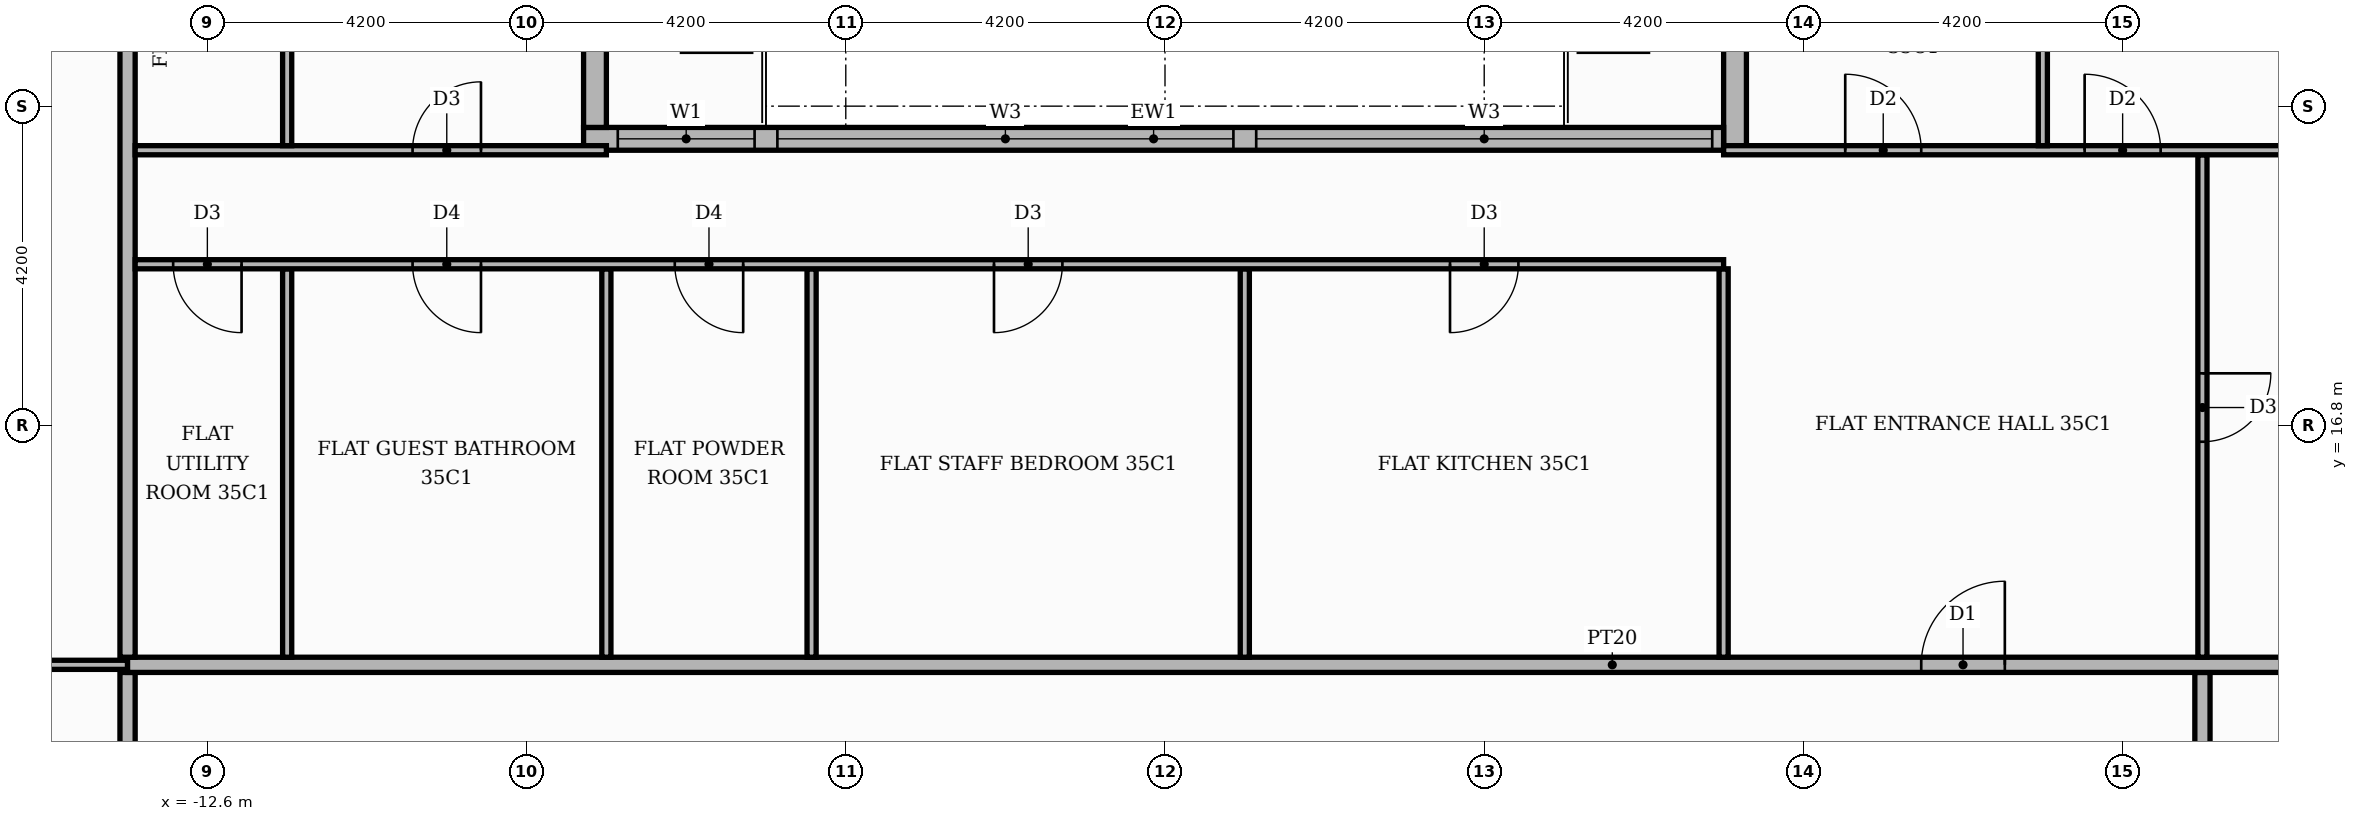
"""IFC4 building model, lengths in metres.
Left out: names, types, materials, properties, quantities, classifications, styles, units other than length and angle.
Written with IfcOpenShell. Run it as: python <this file> out.ifc"""

import sys

from ifc_helpers import new_model, si_unit, direction, frame, frame_2d, origin, place, context, subcontext, project, spatial, rectangle, extrude, element, fill, save


model = new_model("IFC4")
c1 = context("Model", 3, precision=1e-05, world=origin(), true_north=direction((0.0, 1.0)))
c2 = subcontext(c1, "Body", "Model", "MODEL_VIEW")
j1 = project(units=[si_unit("LENGTHUNIT", "METRE"), si_unit("PLANEANGLEUNIT", "RADIAN")], contexts=[c1])
p1 = place(None, origin())
s1 = spatial("IfcSite", under=j1, at=p1, CompositionType="ELEMENT")
p2 = place(p1, origin())
s2 = spatial("IfcBuilding", under=s1, at=p2, CompositionType="ELEMENT")
p3 = place(p2, frame((0.0, 0.0, 149.4)))
s3 = spatial("IfcBuildingStorey", under=s2, at=p3, CompositionType="ELEMENT", Elevation=149.4)
p4 = place(p3, frame((7.5, 25.42, 0.0), z_axis=(0.0, 0.0, 1.0), x_axis=(0.0, -1.0, 0.0)))
e1 = element("IfcWall", 1, at=p4, inside=s3, PredefinedType="STANDARD", context=c2, shape_type="SweptSolid", body=[
    extrude(rectangle(XDim=5.0, YDim=0.3, at=frame_2d((2.5, 0.0))), origin(), (0.0, 0.0, 1.0), 3.48),
])
p5 = place(p4, frame((1.42, 0.0, 0.0)))
e2 = element("IfcOpeningElement", 2, at=p5, cuts=e1, PredefinedType="OPENING", context=c2, shape_type="SweptSolid", body=[
    extrude(rectangle(XDim=1.8, YDim=2.4, at=frame_2d((0.9, 1.2))), frame((0.0, 0.16, 0.0), z_axis=(0.0, -1.0, 0.0), x_axis=(1.0, 0.0, 0.0)), (0.0, 0.0, 1.0), 0.32),
])
p6 = place(p3, frame((7.35, 20.57, 0.0), z_axis=(0.0, 0.0, 1.0), x_axis=(-1.0, 0.0, 0.0)))
e3 = element("IfcWall", 3, at=p6, inside=s3, PredefinedType="STANDARD", context=c2, shape_type="SweptSolid", body=[
    extrude(rectangle(XDim=15.0, YDim=0.3, at=frame_2d((7.5, 0.0))), origin(), (0.0, 0.0, 1.0), 3.48),
])
p7 = place(p6, frame((0.15, 0.0, 0.9)))
e4 = element("IfcOpeningElement", 4, at=p7, cuts=e3, PredefinedType="OPENING", context=c2, shape_type="SweptSolid", body=[
    extrude(rectangle(XDim=6.0, YDim=2.1, at=frame_2d((3.0, 1.05))), frame((0.0, 0.16, 0.0), z_axis=(0.0, -1.0, 0.0), x_axis=(1.0, 0.0, 0.0)), (0.0, 0.0, 1.0), 0.32),
])
p8 = place(p6, frame((6.45, 0.0, 0.9)))
e5 = element("IfcOpeningElement", 5, at=p8, cuts=e3, PredefinedType="OPENING", context=c2, shape_type="SweptSolid", body=[
    extrude(rectangle(XDim=6.0, YDim=2.1, at=frame_2d((3.0, 1.05))), frame((0.0, 0.16, 0.0), z_axis=(0.0, -1.0, 0.0), x_axis=(1.0, 0.0, 0.0)), (0.0, 0.0, 1.0), 0.32),
])
p9 = place(p6, frame((12.75, 0.0, 0.9)))
e6 = element("IfcOpeningElement", 6, at=p9, cuts=e3, PredefinedType="OPENING", context=c2, shape_type="SweptSolid", body=[
    extrude(rectangle(XDim=1.8, YDim=2.1, at=frame_2d((0.9, 1.05))), frame((0.0, 0.16, 0.0), z_axis=(0.0, -1.0, 0.0), x_axis=(1.0, 0.0, 0.0)), (0.0, 0.0, 1.0), 0.32),
])
p10 = place(p3, frame((-7.5, 20.72, 0.0), z_axis=(0.0, 0.0, 1.0), x_axis=(0.0, 1.0, 0.0)))
e7 = element("IfcWall", 7, at=p10, inside=s3, PredefinedType="STANDARD", context=c2, shape_type="SweptSolid", body=[
    extrude(rectangle(XDim=5.0, YDim=0.3, at=frame_2d((2.5, 0.0))), origin(), (0.0, 0.0, 1.0), 3.48),
])
p11 = place(p10, frame((1.48, 0.0, 0.0)))
e8 = element("IfcOpeningElement", 8, at=p11, cuts=e7, PredefinedType="OPENING", context=c2, shape_type="SweptSolid", body=[
    extrude(rectangle(XDim=1.8, YDim=2.4, at=frame_2d((0.9, 1.2))), frame((0.0, 0.16, 0.0), z_axis=(0.0, -1.0, 0.0), x_axis=(1.0, 0.0, 0.0)), (0.0, 0.0, 1.0), 0.32),
])
for number, where, z_axis, x_axis in (
    (9, (-13.65, 11.1, 0.0), (0.0, 0.0, 1.0), (0.0, 1.0, 0.0)),
    (10, (13.65, 11.1, 0.0), (0.0, 0.0, 1.0), (0.0, 1.0, 0.0)),
):
    element("IfcWall", number, at=place(p3, frame(where, z_axis=z_axis, x_axis=x_axis)), inside=s3, PredefinedType="PARTITIONING", context=c2, shape_type="SweptSolid", body=[
        extrude(rectangle(XDim=2.45, YDim=0.2, at=frame_2d((1.225, 0.0))), origin(), (0.0, 0.0, 1.0), 3.48),
    ])
p12 = place(p3, frame((-20.12, 13.65, 0.0), z_axis=(0.0, 0.0, 1.0), x_axis=(1.0, 0.0, 0.0)))
e11 = element("IfcWall", 11, at=p12, inside=s3, PredefinedType="PARTITIONING", context=c2, shape_type="SweptSolid", body=[
    extrude(rectangle(XDim=6.47, YDim=0.12, at=frame_2d((3.235, 0.0))), origin(), (0.0, 0.0, 1.0), 3.48),
])
p13 = place(p12, frame((2.785, 0.0, 0.0)))
e12 = element("IfcOpeningElement", 12, at=p13, cuts=e11, PredefinedType="OPENING", context=c2, shape_type="SweptSolid", body=[
    extrude(rectangle(XDim=0.9, YDim=2.1, at=frame_2d((0.45, 1.05))), frame((0.0, 0.07, 0.0), z_axis=(0.0, -1.0, 0.0), x_axis=(1.0, 0.0, 0.0)), (0.0, 0.0, 1.0), 0.14),
])
p14 = place(p3, frame((-13.65, 13.65, 0.0), z_axis=(0.0, 0.0, 1.0), x_axis=(1.0, 0.0, 0.0)))
e13 = element("IfcWall", 13, at=p14, inside=s3, PredefinedType="PARTITIONING", context=c2, shape_type="SweptSolid", body=[
    extrude(rectangle(XDim=39.07, YDim=0.2, at=frame_2d((19.535, 0.0))), origin(), (0.0, 0.0, 1.0), 3.48),
])
p15 = place(p14, frame((23.6, 0.0, 0.0)))
e14 = element("IfcOpeningElement", 14, at=p15, cuts=e13, PredefinedType="OPENING", context=c2, shape_type="SweptSolid", body=[
    extrude(rectangle(XDim=1.1, YDim=2.4, at=frame_2d((0.55, 1.2))), frame((0.0, 0.11, 0.0), z_axis=(0.0, -1.0, 0.0), x_axis=(1.0, 0.0, 0.0)), (0.0, 0.0, 1.0), 0.22),
])
p16 = place(p3, frame((-13.65, 13.75, 0.0), z_axis=(0.0, 0.0, 1.0), x_axis=(0.0, 1.0, 0.0)))
e15 = element("IfcWall", 15, at=p16, inside=s3, PredefinedType="PARTITIONING", context=c2, shape_type="SweptSolid", body=[
    extrude(rectangle(XDim=11.67, YDim=0.2, at=frame_2d((5.835, 0.0))), origin(), (0.0, 0.0, 1.0), 3.48),
])
for number, where, z_axis, x_axis in (
    (16, (-11.55, 13.75, 0.0), (0.0, 0.0, 1.0), (0.0, 1.0, 0.0)),
    (17, (-7.35, 13.75, 0.0), (0.0, 0.0, 1.0), (0.0, 1.0, 0.0)),
    (18, (-4.65, 13.75, 0.0), (0.0, 0.0, 1.0), (0.0, 1.0, 0.0)),
    (19, (1.05, 13.75, 0.0), (0.0, 0.0, 1.0), (0.0, 1.0, 0.0)),
    (20, (7.35, 13.75, 0.0), (0.0, 0.0, 1.0), (0.0, 1.0, 0.0)),
):
    element("IfcWall", number, at=place(p3, frame(where, z_axis=z_axis, x_axis=x_axis)), inside=s3, PredefinedType="PARTITIONING", context=c2, shape_type="SweptSolid", body=[
        extrude(rectangle(XDim=5.11, YDim=0.12, at=frame_2d((2.555, 0.0))), origin(), (0.0, 0.0, 1.0), 3.48),
    ])
p17 = place(p3, frame((13.65, 13.75, 0.0), z_axis=(0.0, 0.0, 1.0), x_axis=(0.0, 1.0, 0.0)))
e21 = element("IfcWall", 21, at=p17, inside=s3, PredefinedType="PARTITIONING", context=c2, shape_type="SweptSolid", body=[
    extrude(rectangle(XDim=6.61, YDim=0.12, at=frame_2d((3.305, 0.0))), origin(), (0.0, 0.0, 1.0), 3.48),
])
p18 = place(p17, frame((2.835, 0.0, 0.0)))
e22 = element("IfcOpeningElement", 22, at=p18, cuts=e21, PredefinedType="OPENING", context=c2, shape_type="SweptSolid", body=[
    extrude(rectangle(XDim=0.9, YDim=2.1, at=frame_2d((0.45, 1.05))), frame((0.0, 0.07, 0.0), z_axis=(0.0, -1.0, 0.0), x_axis=(1.0, 0.0, 0.0)), (0.0, 0.0, 1.0), 0.14),
])
p19 = place(p3, frame((-13.55, 18.92, 0.0), z_axis=(0.0, 0.0, 1.0), x_axis=(1.0, 0.0, 0.0)))
e23 = element("IfcWall", 23, at=p19, inside=s3, PredefinedType="PARTITIONING", context=c2, shape_type="SweptSolid", body=[
    extrude(rectangle(XDim=20.9, YDim=0.12, at=frame_2d((10.45, 0.0))), origin(), (0.0, 0.0, 1.0), 3.48),
])
p20 = place(p19, frame((17.3, 0.0, 0.0)))
e24 = element("IfcOpeningElement", 24, at=p20, cuts=e23, PredefinedType="OPENING", context=c2, shape_type="SweptSolid", body=[
    extrude(rectangle(XDim=0.9, YDim=2.1, at=frame_2d((0.45, 1.05))), frame((0.0, 0.07, 0.0), z_axis=(0.0, -1.0, 0.0), x_axis=(1.0, 0.0, 0.0)), (0.0, 0.0, 1.0), 0.14),
])
p21 = place(p19, frame((11.3, 0.0, 0.0)))
e25 = element("IfcOpeningElement", 25, at=p21, cuts=e23, PredefinedType="OPENING", context=c2, shape_type="SweptSolid", body=[
    extrude(rectangle(XDim=0.9, YDim=2.1, at=frame_2d((0.45, 1.05))), frame((0.0, 0.07, 0.0), z_axis=(0.0, -1.0, 0.0), x_axis=(1.0, 0.0, 0.0)), (0.0, 0.0, 1.0), 0.14),
])
p22 = place(p19, frame((7.1, 0.0, 0.0)))
e26 = element("IfcOpeningElement", 26, at=p22, cuts=e23, PredefinedType="OPENING", context=c2, shape_type="SweptSolid", body=[
    extrude(rectangle(XDim=0.9, YDim=2.1, at=frame_2d((0.45, 1.05))), frame((0.0, 0.07, 0.0), z_axis=(0.0, -1.0, 0.0), x_axis=(1.0, 0.0, 0.0)), (0.0, 0.0, 1.0), 0.14),
])
p23 = place(p19, frame((3.65, 0.0, 0.0)))
e27 = element("IfcOpeningElement", 27, at=p23, cuts=e23, PredefinedType="OPENING", context=c2, shape_type="SweptSolid", body=[
    extrude(rectangle(XDim=0.9, YDim=2.1, at=frame_2d((0.45, 1.05))), frame((0.0, 0.07, 0.0), z_axis=(0.0, -1.0, 0.0), x_axis=(1.0, 0.0, 0.0)), (0.0, 0.0, 1.0), 0.14),
])
p24 = place(p19, frame((0.5, 0.0, 0.0)))
e28 = element("IfcOpeningElement", 28, at=p24, cuts=e23, PredefinedType="OPENING", context=c2, shape_type="SweptSolid", body=[
    extrude(rectangle(XDim=0.9, YDim=2.1, at=frame_2d((0.45, 1.05))), frame((0.0, 0.07, 0.0), z_axis=(0.0, -1.0, 0.0), x_axis=(1.0, 0.0, 0.0)), (0.0, 0.0, 1.0), 0.14),
])
p25 = place(p3, frame((-13.55, 20.42, 0.0), z_axis=(0.0, 0.0, 1.0), x_axis=(1.0, 0.0, 0.0)))
e29 = element("IfcWall", 29, at=p25, inside=s3, PredefinedType="PARTITIONING", context=c2, shape_type="SweptSolid", body=[
    extrude(rectangle(XDim=6.2, YDim=0.12, at=frame_2d((3.1, 0.0))), origin(), (0.0, 0.0, 1.0), 3.48),
])
p26 = place(p25, frame((3.65, 0.0, 0.0)))
e30 = element("IfcOpeningElement", 30, at=p26, cuts=e29, PredefinedType="OPENING", context=c2, shape_type="SweptSolid", body=[
    extrude(rectangle(XDim=0.9, YDim=2.1, at=frame_2d((0.45, 1.05))), frame((0.0, 0.07, 0.0), z_axis=(0.0, -1.0, 0.0), x_axis=(1.0, 0.0, 0.0)), (0.0, 0.0, 1.0), 0.14),
])
p27 = place(p3, frame((7.35, 20.42, 0.0), z_axis=(0.0, 0.0, 1.0), x_axis=(1.0, 0.0, 0.0)))
e31 = element("IfcWall", 31, at=p27, inside=s3, PredefinedType="PARTITIONING", context=c2, shape_type="SweptSolid", body=[
    extrude(rectangle(XDim=18.07, YDim=0.12, at=frame_2d((9.035, 0.0))), origin(), (0.0, 0.0, 1.0), 3.48),
])
p28 = place(p27, frame((4.75, 0.0, 0.0)))
e32 = element("IfcOpeningElement", 32, at=p28, cuts=e31, PredefinedType="OPENING", context=c2, shape_type="SweptSolid", body=[
    extrude(rectangle(XDim=1.0, YDim=2.1, at=frame_2d((0.5, 1.05))), frame((0.0, 0.07, 0.0), z_axis=(0.0, -1.0, 0.0), x_axis=(1.0, 0.0, 0.0)), (0.0, 0.0, 1.0), 0.14),
])
p29 = place(p27, frame((1.6, 0.0, 0.0)))
e33 = element("IfcOpeningElement", 33, at=p29, cuts=e31, PredefinedType="OPENING", context=c2, shape_type="SweptSolid", body=[
    extrude(rectangle(XDim=1.0, YDim=2.1, at=frame_2d((0.5, 1.05))), frame((0.0, 0.07, 0.0), z_axis=(0.0, -1.0, 0.0), x_axis=(1.0, 0.0, 0.0)), (0.0, 0.0, 1.0), 0.14),
])
p30 = place(p3, frame((-11.55, 20.48, 0.0), z_axis=(0.0, 0.0, 1.0), x_axis=(0.0, 1.0, 0.0)))
e34 = element("IfcWall", 34, at=p30, inside=s3, PredefinedType="PARTITIONING", context=c2, shape_type="SweptSolid", body=[
    extrude(rectangle(XDim=4.94, YDim=0.12, at=frame_2d((2.47, 0.0))), origin(), (0.0, 0.0, 1.0), 3.48),
])
p31 = place(p30, frame((2.14, 0.0, 0.0)))
e35 = element("IfcOpeningElement", 35, at=p31, cuts=e34, PredefinedType="OPENING", context=c2, shape_type="SweptSolid", body=[
    extrude(rectangle(XDim=0.9, YDim=2.1, at=frame_2d((0.45, 1.05))), frame((0.0, 0.07, 0.0), z_axis=(0.0, -1.0, 0.0), x_axis=(1.0, 0.0, 0.0)), (0.0, 0.0, 1.0), 0.14),
])
p32 = place(p3, frame((11.55, 20.48, 0.0), z_axis=(0.0, 0.0, 1.0), x_axis=(0.0, 1.0, 0.0)))
e36 = element("IfcWall", 36, at=p32, inside=s3, PredefinedType="PARTITIONING", context=c2, shape_type="SweptSolid", body=[
    extrude(rectangle(XDim=4.94, YDim=0.12, at=frame_2d((2.47, 0.0))), origin(), (0.0, 0.0, 1.0), 3.48),
])
p33 = place(p7, origin())
e37 = element("IfcWindow", 37, at=p33, inside=s3, PartitioningType="SINGLE_PANEL", PredefinedType="WINDOW", context=c2, shape_type="SweptSolid", body=[
    extrude(rectangle(XDim=6.0, YDim=2.1, at=frame_2d((3.0, 1.05))), frame((0.0, 0.03, 0.0), z_axis=(0.0, -1.0, 0.0), x_axis=(1.0, 0.0, 0.0)), (0.0, 0.0, 1.0), 0.06),
])
fill(e4, e37)
p34 = place(p8, origin())
e38 = element("IfcWindow", 38, at=p34, inside=s3, PartitioningType="SINGLE_PANEL", PredefinedType="WINDOW", context=c2, shape_type="SweptSolid", body=[
    extrude(rectangle(XDim=6.0, YDim=2.1, at=frame_2d((3.0, 1.05))), frame((0.0, 0.03, 0.0), z_axis=(0.0, -1.0, 0.0), x_axis=(1.0, 0.0, 0.0)), (0.0, 0.0, 1.0), 0.06),
])
fill(e5, e38)
p35 = place(p9, origin())
e39 = element("IfcWindow", 39, at=p35, inside=s3, PartitioningType="SINGLE_PANEL", PredefinedType="WINDOW", context=c2, shape_type="SweptSolid", body=[
    extrude(rectangle(XDim=1.8, YDim=2.1, at=frame_2d((0.9, 1.05))), frame((0.0, 0.03, 0.0), z_axis=(0.0, -1.0, 0.0), x_axis=(1.0, 0.0, 0.0)), (0.0, 0.0, 1.0), 0.06),
])
fill(e6, e39)
p36 = place(p15, origin())
e40 = element("IfcDoor", 40, at=p36, inside=s3, OperationType="SINGLE_SWING_RIGHT", PredefinedType="DOOR", context=c2, shape_type="SweptSolid", body=[
    extrude(rectangle(XDim=1.1, YDim=2.4, at=frame_2d((0.55, 1.2))), frame((0.0, 0.025, 0.0), z_axis=(0.0, -1.0, 0.0), x_axis=(1.0, 0.0, 0.0)), (0.0, 0.0, 1.0), 0.05),
])
fill(e14, e40)
p37 = place(p18, frame((0.9, 0.0, 0.0), z_axis=(0.0, 0.0, 1.0), x_axis=(-1.0, 0.0, 0.0)))
e41 = element("IfcDoor", 41, at=p37, inside=s3, OperationType="SINGLE_SWING_RIGHT", PredefinedType="DOOR", context=c2, shape_type="SweptSolid", body=[
    extrude(rectangle(XDim=0.9, YDim=2.1, at=frame_2d((0.45, 1.05))), frame((0.0, 0.025, 0.0), z_axis=(0.0, -1.0, 0.0), x_axis=(1.0, 0.0, 0.0)), (0.0, 0.0, 1.0), 0.05),
])
fill(e22, e41)
p38 = place(p20, frame((0.9, 0.0, 0.0), z_axis=(0.0, 0.0, 1.0), x_axis=(-1.0, 0.0, 0.0)))
e42 = element("IfcDoor", 42, at=p38, inside=s3, OperationType="SINGLE_SWING_LEFT", PredefinedType="DOOR", context=c2, shape_type="SweptSolid", body=[
    extrude(rectangle(XDim=0.9, YDim=2.1, at=frame_2d((0.45, 1.05))), frame((0.0, 0.025, 0.0), z_axis=(0.0, -1.0, 0.0), x_axis=(1.0, 0.0, 0.0)), (0.0, 0.0, 1.0), 0.05),
])
fill(e24, e42)
p39 = place(p21, frame((0.9, 0.0, 0.0), z_axis=(0.0, 0.0, 1.0), x_axis=(-1.0, 0.0, 0.0)))
e43 = element("IfcDoor", 43, at=p39, inside=s3, OperationType="SINGLE_SWING_LEFT", PredefinedType="DOOR", context=c2, shape_type="SweptSolid", body=[
    extrude(rectangle(XDim=0.9, YDim=2.1, at=frame_2d((0.45, 1.05))), frame((0.0, 0.025, 0.0), z_axis=(0.0, -1.0, 0.0), x_axis=(1.0, 0.0, 0.0)), (0.0, 0.0, 1.0), 0.05),
])
fill(e25, e43)
p40 = place(p22, frame((0.9, 0.0, 0.0), z_axis=(0.0, 0.0, 1.0), x_axis=(-1.0, 0.0, 0.0)))
e44 = element("IfcDoor", 44, at=p40, inside=s3, OperationType="SINGLE_SWING_RIGHT", PredefinedType="DOOR", context=c2, shape_type="SweptSolid", body=[
    extrude(rectangle(XDim=0.9, YDim=2.1, at=frame_2d((0.45, 1.05))), frame((0.0, 0.025, 0.0), z_axis=(0.0, -1.0, 0.0), x_axis=(1.0, 0.0, 0.0)), (0.0, 0.0, 1.0), 0.05),
])
fill(e26, e44)
p41 = place(p23, frame((0.9, 0.0, 0.0), z_axis=(0.0, 0.0, 1.0), x_axis=(-1.0, 0.0, 0.0)))
e45 = element("IfcDoor", 45, at=p41, inside=s3, OperationType="SINGLE_SWING_RIGHT", PredefinedType="DOOR", context=c2, shape_type="SweptSolid", body=[
    extrude(rectangle(XDim=0.9, YDim=2.1, at=frame_2d((0.45, 1.05))), frame((0.0, 0.025, 0.0), z_axis=(0.0, -1.0, 0.0), x_axis=(1.0, 0.0, 0.0)), (0.0, 0.0, 1.0), 0.05),
])
fill(e27, e45)
p42 = place(p24, frame((0.9, 0.0, 0.0), z_axis=(0.0, 0.0, 1.0), x_axis=(-1.0, 0.0, 0.0)))
e46 = element("IfcDoor", 46, at=p42, inside=s3, OperationType="SINGLE_SWING_RIGHT", PredefinedType="DOOR", context=c2, shape_type="SweptSolid", body=[
    extrude(rectangle(XDim=0.9, YDim=2.1, at=frame_2d((0.45, 1.05))), frame((0.0, 0.025, 0.0), z_axis=(0.0, -1.0, 0.0), x_axis=(1.0, 0.0, 0.0)), (0.0, 0.0, 1.0), 0.05),
])
fill(e28, e46)
p43 = place(p28, origin())
e47 = element("IfcDoor", 47, at=p43, inside=s3, OperationType="SINGLE_SWING_LEFT", PredefinedType="DOOR", context=c2, shape_type="SweptSolid", body=[
    extrude(rectangle(XDim=1.0, YDim=2.1, at=frame_2d((0.5, 1.05))), frame((0.0, 0.025, 0.0), z_axis=(0.0, -1.0, 0.0), x_axis=(1.0, 0.0, 0.0)), (0.0, 0.0, 1.0), 0.05),
])
fill(e32, e47)
p44 = place(p29, origin())
e48 = element("IfcDoor", 48, at=p44, inside=s3, OperationType="SINGLE_SWING_LEFT", PredefinedType="DOOR", context=c2, shape_type="SweptSolid", body=[
    extrude(rectangle(XDim=1.0, YDim=2.1, at=frame_2d((0.5, 1.05))), frame((0.0, 0.025, 0.0), z_axis=(0.0, -1.0, 0.0), x_axis=(1.0, 0.0, 0.0)), (0.0, 0.0, 1.0), 0.05),
])
fill(e33, e48)
p45 = place(p26, origin())
e49 = element("IfcDoor", 49, at=p45, inside=s3, OperationType="SINGLE_SWING_RIGHT", PredefinedType="DOOR", context=c2, shape_type="SweptSolid", body=[
    extrude(rectangle(XDim=0.9, YDim=2.1, at=frame_2d((0.45, 1.05))), frame((0.0, 0.025, 0.0), z_axis=(0.0, -1.0, 0.0), x_axis=(1.0, 0.0, 0.0)), (0.0, 0.0, 1.0), 0.05),
])
fill(e30, e49)
save(model, sys.argv[1])
